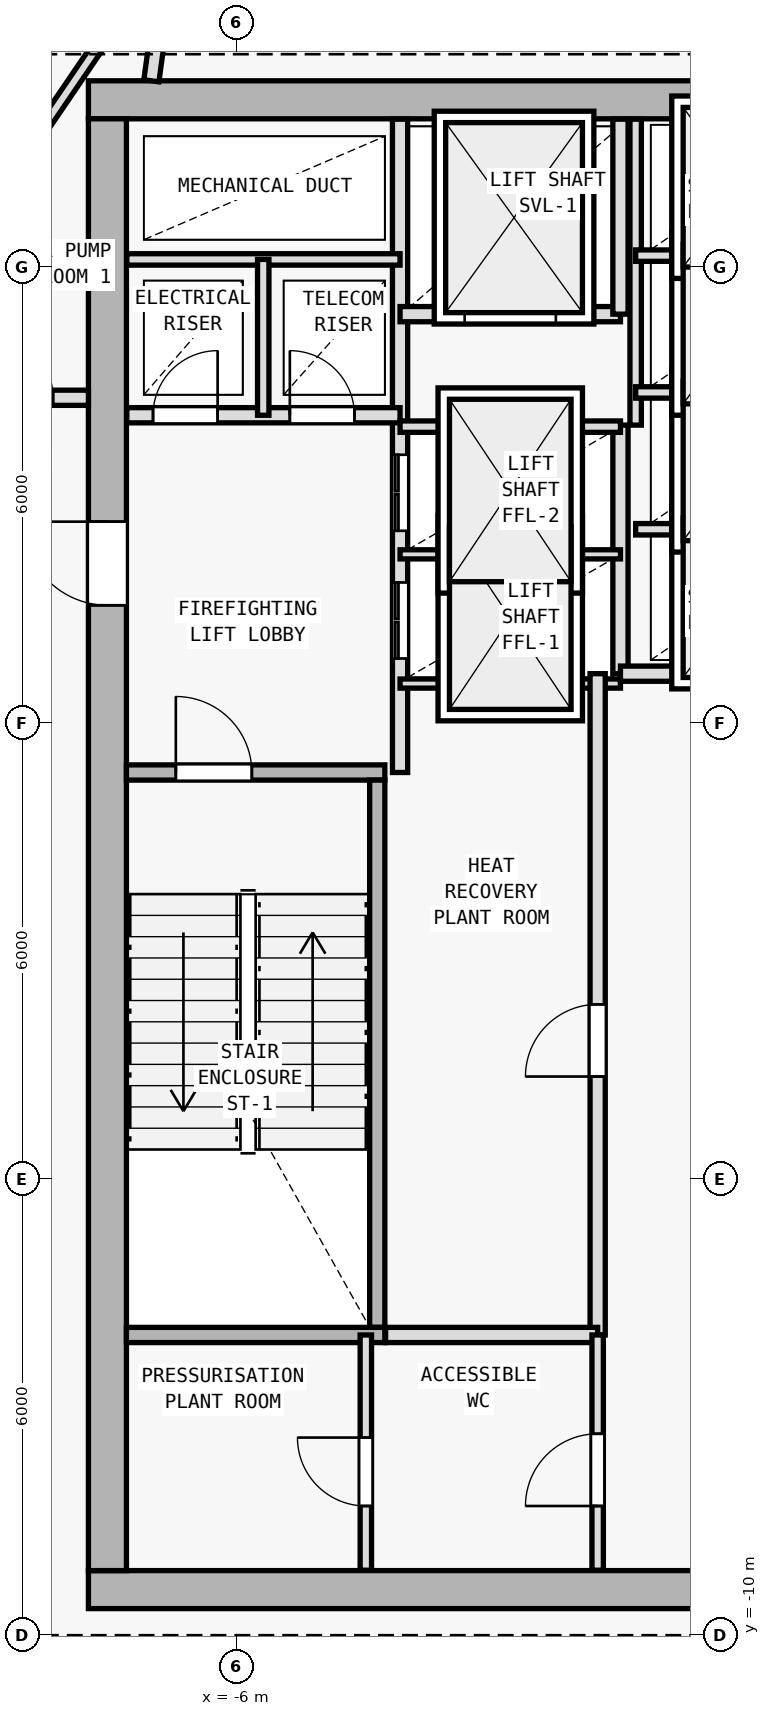
"""IFC4 building model, lengths in metres.
Left out: names, types, materials, properties, quantities, classifications, styles, units other than length and angle.
Written with IfcOpenShell. Run it as: python <this file> out.ifc"""

import sys

from ifc_helpers import new_model, si_unit, direction, frame, frame_2d, origin, origin_2d, place, context, subcontext, project, spatial, rectangle, i_section, extrude, element, fill, save


model = new_model("IFC4")
c1 = context("Model", 3, precision=1e-05, world=origin(), true_north=direction((0.0, 1.0)))
c2 = subcontext(c1, "Body", "Model", "MODEL_VIEW")
j1 = project(units=[si_unit("LENGTHUNIT", "METRE"), si_unit("PLANEANGLEUNIT", "RADIAN")], contexts=[c1])
p1 = place(None, origin())
s1 = spatial("IfcSite", under=j1, at=p1, CompositionType="ELEMENT")
p2 = place(p1, origin())
s2 = spatial("IfcBuilding", under=s1, at=p2, CompositionType="ELEMENT")
p3 = place(p2, frame((0.0, 0.0, 241.5)))
s3 = spatial("IfcBuildingStorey", under=s2, at=p3, CompositionType="ELEMENT", Elevation=241.5)
for number, where, z_axis, x_axis in (
    (1, (-7.7, -9.4, 0.0), (0.0, 0.0, 1.0), (1.0, 0.0, 0.0)),
    (2, (-7.7, 10.2, 0.0), (0.0, 0.0, 1.0), (1.0, 0.0, 0.0)),
    (3, (0.0, -9.4, 0.0), (0.0, 0.0, 1.0), (1.0, 0.0, 0.0)),
    (4, (-7.7, 2.0, 0.0), (0.0, 0.0, 1.0), (1.0, 0.0, 0.0)),
):
    element("IfcColumn", number, at=place(p3, frame(where, z_axis=z_axis, x_axis=x_axis)), inside=s3, PredefinedType="COLUMN", context=c2, shape_type="SweptSolid", body=[
        extrude(i_section(OverallWidth=0.398, OverallDepth=0.387, WebThickness=0.013, FlangeThickness=0.022, FilletRadius=0.015, at=origin_2d()), origin(), (0.0, 0.0, 1.0), 4.8),
    ])
p4 = place(p3, frame((-7.95, -9.4, 0.0), z_axis=(0.0, 0.0, 1.0), x_axis=(1.0, 0.0, 0.0)))
e5 = element("IfcWall", 5, at=p4, inside=s3, PredefinedType="SHEAR", context=c2, shape_type="SweptSolid", body=[
    extrude(rectangle(XDim=15.9, YDim=0.5, at=frame_2d((7.95, 0.0))), origin(), (0.0, 0.0, 1.0), 4.5),
])
p5 = place(p4, frame((9.6, 0.0, 0.0)))
e6 = element("IfcOpeningElement", 6, at=p5, cuts=e5, PredefinedType="OPENING", context=c2, shape_type="SweptSolid", body=[
    extrude(rectangle(XDim=1.5, YDim=2.2, at=frame_2d((0.75, 1.1))), frame((0.0, 0.26, 0.0), z_axis=(0.0, -1.0, 0.0), x_axis=(1.0, 0.0, 0.0)), (0.0, 0.0, 1.0), 0.52),
])
p6 = place(p3, frame((7.95, 10.2, 0.0), z_axis=(0.0, 0.0, 1.0), x_axis=(-1.0, 0.0, 0.0)))
e7 = element("IfcWall", 7, at=p6, inside=s3, PredefinedType="SHEAR", context=c2, shape_type="SweptSolid", body=[
    extrude(rectangle(XDim=15.9, YDim=0.5, at=frame_2d((7.95, 0.0))), origin(), (0.0, 0.0, 1.0), 4.5),
])
p7 = place(p3, frame((-7.7, -9.15, 0.0), z_axis=(0.0, 0.0, 1.0), x_axis=(0.0, 1.0, 0.0)))
e8 = element("IfcWall", 8, at=p7, inside=s3, PredefinedType="SHEAR", context=c2, shape_type="SweptSolid", body=[
    extrude(rectangle(XDim=19.1, YDim=0.5, at=frame_2d((9.55, 0.0))), origin(), (0.0, 0.0, 1.0), 4.5),
])
p8 = place(p7, frame((12.7, 0.0, 0.0)))
e9 = element("IfcOpeningElement", 9, at=p8, cuts=e8, PredefinedType="OPENING", context=c2, shape_type="SweptSolid", body=[
    extrude(rectangle(XDim=1.1, YDim=2.15, at=frame_2d((0.55, 1.075))), frame((0.0, 0.26, 0.0), z_axis=(0.0, -1.0, 0.0), x_axis=(1.0, 0.0, 0.0)), (0.0, 0.0, 1.0), 0.52),
])
p9 = place(p3, frame((-7.45, 1.35, 0.0), z_axis=(0.0, 0.0, 1.0), x_axis=(1.0, 0.0, 0.0)))
e10 = element("IfcWall", 10, at=p9, inside=s3, PredefinedType="SOLIDWALL", context=c2, shape_type="SweptSolid", body=[
    extrude(rectangle(XDim=3.4, YDim=0.2, at=frame_2d((1.7, 0.0))), origin(), (0.0, 0.0, 1.0), 4.5),
])
p10 = place(p9, frame((0.65, 0.0, 0.0)))
e11 = element("IfcOpeningElement", 11, at=p10, cuts=e10, PredefinedType="OPENING", context=c2, shape_type="SweptSolid", body=[
    extrude(rectangle(XDim=1.0, YDim=2.15, at=frame_2d((0.5, 1.075))), frame((0.0, 0.11, 0.0), z_axis=(0.0, -1.0, 0.0), x_axis=(1.0, 0.0, 0.0)), (0.0, 0.0, 1.0), 0.22),
])
p11 = place(p3, frame((-4.15, -5.95, 0.0), z_axis=(0.0, 0.0, 1.0), x_axis=(0.0, 1.0, 0.0)))
e12 = element("IfcWall", 12, at=p11, inside=s3, PredefinedType="SOLIDWALL", context=c2, shape_type="SweptSolid", body=[
    extrude(rectangle(XDim=7.2, YDim=0.2, at=frame_2d((3.6, 0.0))), origin(), (0.0, 0.0, 1.0), 4.5),
])
p12 = place(p3, frame((-3.85, 1.35, 0.0), z_axis=(0.0, 0.0, 1.0), x_axis=(0.0, 1.0, 0.0)))
e13 = element("IfcWall", 13, at=p12, inside=s3, PredefinedType="SOLIDWALL", context=c2, shape_type="SweptSolid", body=[
    extrude(rectangle(XDim=8.595, YDim=0.2, at=frame_2d((4.297, 0.0))), origin(), (0.0, 0.0, 1.0), 4.5),
])
p13 = place(p12, frame((1.5, 0.0, 0.0)))
e14 = element("IfcOpeningElement", 14, at=p13, cuts=e13, PredefinedType="OPENING", context=c2, shape_type="SweptSolid", body=[
    extrude(rectangle(XDim=1.0, YDim=2.15, at=frame_2d((0.5, 1.075))), frame((0.0, 0.11, 0.0), z_axis=(0.0, -1.0, 0.0), x_axis=(1.0, 0.0, 0.0)), (0.0, 0.0, 1.0), 0.22),
])
p14 = place(p12, frame((3.18, 0.0, 0.0)))
e15 = element("IfcOpeningElement", 15, at=p14, cuts=e13, PredefinedType="OPENING", context=c2, shape_type="SweptSolid", body=[
    extrude(rectangle(XDim=1.0, YDim=2.15, at=frame_2d((0.5, 1.075))), frame((0.0, 0.11, 0.0), z_axis=(0.0, -1.0, 0.0), x_axis=(1.0, 0.0, 0.0)), (0.0, 0.0, 1.0), 0.22),
])
p15 = place(p3, frame((-7.445, 6.05, 0.0), z_axis=(0.0, 0.0, 1.0), x_axis=(1.0, 0.0, 0.0)))
e16 = element("IfcWall", 16, at=p15, inside=s3, PredefinedType="SOLIDWALL", context=c2, shape_type="SweptSolid", body=[
    extrude(rectangle(XDim=3.595, YDim=0.2, at=frame_2d((1.797, 0.0))), origin(), (0.0, 0.0, 1.0), 4.5),
])
p16 = place(p15, frame((0.345, 0.0, 0.0)))
e17 = element("IfcOpeningElement", 17, at=p16, cuts=e16, PredefinedType="OPENING", context=c2, shape_type="SweptSolid", body=[
    extrude(rectangle(XDim=0.85, YDim=2.1, at=frame_2d((0.425, 1.05))), frame((0.0, 0.11, 0.0), z_axis=(0.0, -1.0, 0.0), x_axis=(1.0, 0.0, 0.0)), (0.0, 0.0, 1.0), 0.22),
])
p17 = place(p15, frame((2.145, 0.0, 0.0)))
e18 = element("IfcOpeningElement", 18, at=p17, cuts=e16, PredefinedType="OPENING", context=c2, shape_type="SweptSolid", body=[
    extrude(rectangle(XDim=0.85, YDim=2.1, at=frame_2d((0.425, 1.05))), frame((0.0, 0.11, 0.0), z_axis=(0.0, -1.0, 0.0), x_axis=(1.0, 0.0, 0.0)), (0.0, 0.0, 1.0), 0.22),
])
p18 = place(p3, frame((-7.445, 8.1, 0.0), z_axis=(0.0, 0.0, 1.0), x_axis=(1.0, 0.0, 0.0)))
e19 = element("IfcWall", 19, at=p18, inside=s3, PredefinedType="PARTITIONING", context=c2, shape_type="SweptSolid", body=[
    extrude(rectangle(XDim=3.595, YDim=0.15, at=frame_2d((1.797, 0.0))), origin(), (0.0, 0.0, 1.0), 4.5),
])
p19 = place(p3, frame((-5.65, 6.05, 0.0), z_axis=(0.0, 0.0, 1.0), x_axis=(0.0, 1.0, 0.0)))
e20 = element("IfcWall", 20, at=p19, inside=s3, PredefinedType="PARTITIONING", context=c2, shape_type="SweptSolid", body=[
    extrude(rectangle(XDim=2.05, YDim=0.15, at=frame_2d((1.025, 0.0))), origin(), (0.0, 0.0, 1.0), 4.5),
])
p20 = place(p3, frame((-0.95, 2.65, 0.0), z_axis=(0.0, 0.0, 1.0), x_axis=(0.0, 1.0, 0.0)))
e21 = element("IfcWall", 21, at=p20, inside=s3, PredefinedType="SOLIDWALL", context=c2, shape_type="SweptSolid", body=[
    extrude(rectangle(XDim=3.27, YDim=0.2, at=frame_2d((1.635, 0.0))), origin(), (0.0, 0.0, 1.0), 4.5),
])
for number, where, z_axis, x_axis in (
    (22, (-3.85, 2.52, 0.0), (0.0, 0.0, 1.0), (1.0, 0.0, 0.0)),
    (23, (-3.85, 4.22, 0.0), (0.0, 0.0, 1.0), (1.0, 0.0, 0.0)),
):
    element("IfcWall", number, at=place(p3, frame(where, z_axis=z_axis, x_axis=x_axis)), inside=s3, PredefinedType="PARTITIONING", context=c2, shape_type="SweptSolid", body=[
        extrude(rectangle(XDim=2.9, YDim=0.12, at=frame_2d((1.45, 0.0))), origin(), (0.0, 0.0, 1.0), 4.5),
    ])
p21 = place(p3, frame((-3.85, 5.9, 0.0), z_axis=(0.0, 0.0, 1.0), x_axis=(1.0, 0.0, 0.0)))
e24 = element("IfcWall", 24, at=p21, inside=s3, PredefinedType="PARTITIONING", context=c2, shape_type="SweptSolid", body=[
    extrude(rectangle(XDim=2.9, YDim=0.15, at=frame_2d((1.45, 0.0))), origin(), (0.0, 0.0, 1.0), 4.5),
])
p22 = place(p3, frame((-3.85, 7.38, 0.0), z_axis=(0.0, 0.0, 1.0), x_axis=(1.0, 0.0, 0.0)))
e25 = element("IfcWall", 25, at=p22, inside=s3, PredefinedType="SOLIDWALL", context=c2, shape_type="SweptSolid", body=[
    extrude(rectangle(XDim=2.9, YDim=0.2, at=frame_2d((1.45, 0.0))), origin(), (0.0, 0.0, 1.0), 4.5),
])
p23 = place(p22, frame((0.85, 0.0, 0.0)))
e26 = element("IfcOpeningElement", 26, at=p23, cuts=e25, PredefinedType="OPENING", context=c2, shape_type="SweptSolid", body=[
    extrude(rectangle(XDim=1.2, YDim=2.2, at=frame_2d((0.6, 1.1))), frame((0.0, 0.11, 0.0), z_axis=(0.0, -1.0, 0.0), x_axis=(1.0, 0.0, 0.0)), (0.0, 0.0, 1.0), 0.22),
])
p24 = place(p3, frame((-0.95, 7.38, 0.0), z_axis=(0.0, 0.0, 1.0), x_axis=(0.0, 1.0, 0.0)))
e27 = element("IfcWall", 27, at=p24, inside=s3, PredefinedType="SOLIDWALL", context=c2, shape_type="SweptSolid", body=[
    extrude(rectangle(XDim=2.565, YDim=0.2, at=frame_2d((1.283, 0.0))), origin(), (0.0, 0.0, 1.0), 4.5),
])
p25 = place(p3, frame((-1.25, -6.05, 0.0), z_axis=(0.0, 0.0, 1.0), x_axis=(0.0, 1.0, 0.0)))
e28 = element("IfcWall", 28, at=p25, inside=s3, PredefinedType="SOLIDWALL", context=c2, shape_type="SweptSolid", body=[
    extrude(rectangle(XDim=8.7, YDim=0.2, at=frame_2d((4.35, 0.0))), origin(), (0.0, 0.0, 1.0), 4.5),
])
p26 = place(p25, frame((3.4, 0.0, 0.0)))
e29 = element("IfcOpeningElement", 29, at=p26, cuts=e28, PredefinedType="OPENING", context=c2, shape_type="SweptSolid", body=[
    extrude(rectangle(XDim=0.95, YDim=2.1, at=frame_2d((0.475, 1.05))), frame((0.0, 0.11, 0.0), z_axis=(0.0, -1.0, 0.0), x_axis=(1.0, 0.0, 0.0)), (0.0, 0.0, 1.0), 0.22),
])
p27 = place(p3, frame((-0.95, 2.65, 0.0), z_axis=(0.0, 0.0, 1.0), x_axis=(1.0, 0.0, 0.0)))
e30 = element("IfcWall", 30, at=p27, inside=s3, PredefinedType="SOLIDWALL", context=c2, shape_type="SweptSolid", body=[
    extrude(rectangle(XDim=2.9, YDim=0.2, at=frame_2d((1.45, 0.0))), origin(), (0.0, 0.0, 1.0), 4.5),
])
p28 = place(p3, frame((-0.75, 5.92, 0.0), z_axis=(0.0, 0.0, 1.0), x_axis=(0.0, 1.0, 0.0)))
e31 = element("IfcWall", 31, at=p28, inside=s3, PredefinedType="PARTITIONING", context=c2, shape_type="SweptSolid", body=[
    extrude(rectangle(XDim=4.025, YDim=0.15, at=frame_2d((2.013, 0.0))), origin(), (0.0, 0.0, 1.0), 4.5),
])
for number, where, z_axis, x_axis in (
    (32, (-0.75, 4.55, 0.0), (0.0, 0.0, 1.0), (1.0, 0.0, 0.0)),
    (33, (-0.75, 6.35, 0.0), (0.0, 0.0, 1.0), (1.0, 0.0, 0.0)),
    (34, (-0.75, 8.15, 0.0), (0.0, 0.0, 1.0), (1.0, 0.0, 0.0)),
):
    element("IfcWall", number, at=place(p3, frame(where, z_axis=z_axis, x_axis=x_axis)), inside=s3, PredefinedType="PARTITIONING", context=c2, shape_type="SweptSolid", body=[
        extrude(rectangle(XDim=2.7, YDim=0.15, at=frame_2d((1.35, 0.0))), origin(), (0.0, 0.0, 1.0), 4.5),
    ])
p29 = place(p3, frame((-7.45, -6.05, 0.0), z_axis=(0.0, 0.0, 1.0), x_axis=(1.0, 0.0, 0.0)))
e35 = element("IfcWall", 35, at=p29, inside=s3, PredefinedType="SOLIDWALL", context=c2, shape_type="SweptSolid", body=[
    extrude(rectangle(XDim=3.4, YDim=0.2, at=frame_2d((1.7, 0.0))), origin(), (0.0, 0.0, 1.0), 4.5),
])
p30 = place(p3, frame((-4.04, -6.05, 0.0), z_axis=(0.0, 0.0, 1.0), x_axis=(1.0, 0.0, 0.0)))
e36 = element("IfcWall", 36, at=p30, inside=s3, PredefinedType="SOLIDWALL", context=c2, shape_type="SweptSolid", body=[
    extrude(rectangle(XDim=2.79, YDim=0.2, at=frame_2d((1.395, 0.0))), origin(), (0.0, 0.0, 1.0), 4.5),
])
p31 = place(p3, frame((-1.25, -9.145, 0.0), z_axis=(0.0, 0.0, 1.0), x_axis=(0.0, 1.0, 0.0)))
e37 = element("IfcWall", 37, at=p31, inside=s3, PredefinedType="PARTITIONING", context=c2, shape_type="SweptSolid", body=[
    extrude(rectangle(XDim=3.095, YDim=0.15, at=frame_2d((1.547, 0.0))), origin(), (0.0, 0.0, 1.0), 4.5),
])
p32 = place(p31, frame((0.845, 0.0, 0.0)))
e38 = element("IfcOpeningElement", 38, at=p32, cuts=e37, PredefinedType="OPENING", context=c2, shape_type="SweptSolid", body=[
    extrude(rectangle(XDim=0.95, YDim=2.1, at=frame_2d((0.475, 1.05))), frame((0.0, 0.085, 0.0), z_axis=(0.0, -1.0, 0.0), x_axis=(1.0, 0.0, 0.0)), (0.0, 0.0, 1.0), 0.17),
])
p33 = place(p3, frame((-4.3, -9.145, 0.0), z_axis=(0.0, 0.0, 1.0), x_axis=(0.0, 1.0, 0.0)))
e39 = element("IfcWall", 39, at=p33, inside=s3, PredefinedType="PARTITIONING", context=c2, shape_type="SweptSolid", body=[
    extrude(rectangle(XDim=3.095, YDim=0.15, at=frame_2d((1.547, 0.0))), origin(), (0.0, 0.0, 1.0), 4.5),
])
p34 = place(p33, frame((0.845, 0.0, 0.0)))
e40 = element("IfcOpeningElement", 40, at=p34, cuts=e39, PredefinedType="OPENING", context=c2, shape_type="SweptSolid", body=[
    extrude(rectangle(XDim=0.9, YDim=2.1, at=frame_2d((0.45, 1.05))), frame((0.0, 0.085, 0.0), z_axis=(0.0, -1.0, 0.0), x_axis=(1.0, 0.0, 0.0)), (0.0, 0.0, 1.0), 0.17),
])
p35 = place(p3, frame((-12.47, 4.073, 0.0), z_axis=(0.0, 0.0, 1.0), x_axis=(0.562473312613, 0.826815440469, 0.0)))
e41 = element("IfcWall", 41, at=p35, inside=s3, PredefinedType="PARTITIONING", context=c2, shape_type="SweptSolid", body=[
    extrude(rectangle(XDim=11.409, YDim=0.15, at=frame_2d((5.705, 0.0))), origin(), (0.0, 0.0, 1.0), 3.925),
])
p36 = place(p3, frame((-9.83, 6.28, 0.0), z_axis=(0.0, 0.0, 1.0), x_axis=(1.0, 0.0, 0.0)))
e42 = element("IfcWall", 42, at=p36, inside=s3, PredefinedType="SOLIDWALL", context=c2, shape_type="SweptSolid", body=[
    extrude(rectangle(XDim=1.88, YDim=0.2, at=frame_2d((0.94, 0.0))), origin(), (0.0, 0.0, 1.0), 3.925),
])
p37 = place(p36, frame((0.565, 0.0, 0.0)))
e43 = element("IfcOpeningElement", 43, at=p37, cuts=e42, PredefinedType="OPENING", context=c2, shape_type="SweptSolid", body=[
    extrude(rectangle(XDim=0.85, YDim=2.1, at=frame_2d((0.425, 1.05))), frame((0.0, 0.11, 0.0), z_axis=(0.0, -1.0, 0.0), x_axis=(1.0, 0.0, 0.0)), (0.0, 0.0, 1.0), 0.22),
])
p38 = place(p3, frame((-7.122, 10.45, 0.0), z_axis=(0.0, 0.0, 1.0), x_axis=(0.135914078288, 0.990720628292, 0.0)))
e44 = element("IfcWall", 44, at=p38, inside=s3, PredefinedType="SOLIDWALL", context=c2, shape_type="SweptSolid", body=[
    extrude(rectangle(XDim=1.496, YDim=0.2, at=frame_2d((0.748, 0.0))), origin(), (0.0, 0.0, 1.0), 3.925),
])
p39 = place(p8, origin())
e45 = element("IfcDoor", 45, at=p39, inside=s3, OperationType="SINGLE_SWING_RIGHT", PredefinedType="DOOR", context=c2, shape_type="SweptSolid", body=[
    extrude(rectangle(XDim=1.1, YDim=2.15, at=frame_2d((0.55, 1.075))), frame((0.0, 0.025, 0.0), z_axis=(0.0, -1.0, 0.0), x_axis=(1.0, 0.0, 0.0)), (0.0, 0.0, 1.0), 0.05),
])
fill(e9, e45)
p40 = place(p10, origin())
e46 = element("IfcDoor", 46, at=p40, inside=s3, OperationType="SINGLE_SWING_LEFT", PredefinedType="DOOR", context=c2, shape_type="SweptSolid", body=[
    extrude(rectangle(XDim=1.0, YDim=2.15, at=frame_2d((0.5, 1.075))), frame((0.0, 0.025, 0.0), z_axis=(0.0, -1.0, 0.0), x_axis=(1.0, 0.0, 0.0)), (0.0, 0.0, 1.0), 0.05),
])
fill(e11, e46)
p41 = place(p16, origin())
e47 = element("IfcDoor", 47, at=p41, inside=s3, OperationType="SINGLE_SWING_RIGHT", PredefinedType="DOOR", context=c2, shape_type="SweptSolid", body=[
    extrude(rectangle(XDim=0.85, YDim=2.1, at=frame_2d((0.425, 1.05))), frame((0.0, 0.025, 0.0), z_axis=(0.0, -1.0, 0.0), x_axis=(1.0, 0.0, 0.0)), (0.0, 0.0, 1.0), 0.05),
])
fill(e17, e47)
p42 = place(p17, origin())
e48 = element("IfcDoor", 48, at=p42, inside=s3, OperationType="SINGLE_SWING_LEFT", PredefinedType="DOOR", context=c2, shape_type="SweptSolid", body=[
    extrude(rectangle(XDim=0.85, YDim=2.1, at=frame_2d((0.425, 1.05))), frame((0.0, 0.025, 0.0), z_axis=(0.0, -1.0, 0.0), x_axis=(1.0, 0.0, 0.0)), (0.0, 0.0, 1.0), 0.05),
])
fill(e18, e48)
p43 = place(p23, origin())
e49 = element("IfcDoor", 49, at=p43, inside=s3, OperationType="DOUBLE_DOOR_SLIDING", PredefinedType="DOOR", context=c2, shape_type="SweptSolid", body=[
    extrude(rectangle(XDim=1.2, YDim=2.2, at=frame_2d((0.6, 1.1))), frame((0.0, 0.025, 0.0), z_axis=(0.0, -1.0, 0.0), x_axis=(1.0, 0.0, 0.0)), (0.0, 0.0, 1.0), 0.05),
])
fill(e26, e49)
p44 = place(p26, origin())
e50 = element("IfcDoor", 50, at=p44, inside=s3, OperationType="SINGLE_SWING_LEFT", PredefinedType="DOOR", context=c2, shape_type="SweptSolid", body=[
    extrude(rectangle(XDim=0.95, YDim=2.1, at=frame_2d((0.475, 1.05))), frame((0.0, 0.025, 0.0), z_axis=(0.0, -1.0, 0.0), x_axis=(1.0, 0.0, 0.0)), (0.0, 0.0, 1.0), 0.05),
])
fill(e29, e50)
p45 = place(p13, origin())
e51 = element("IfcDoor", 51, at=p45, inside=s3, OperationType="DOUBLE_DOOR_SLIDING", PredefinedType="DOOR", context=c2, shape_type="SweptSolid", body=[
    extrude(rectangle(XDim=1.0, YDim=2.15, at=frame_2d((0.5, 1.075))), frame((0.0, 0.025, 0.0), z_axis=(0.0, -1.0, 0.0), x_axis=(1.0, 0.0, 0.0)), (0.0, 0.0, 1.0), 0.05),
])
fill(e14, e51)
p46 = place(p14, origin())
e52 = element("IfcDoor", 52, at=p46, inside=s3, OperationType="DOUBLE_DOOR_SLIDING", PredefinedType="DOOR", context=c2, shape_type="SweptSolid", body=[
    extrude(rectangle(XDim=1.0, YDim=2.15, at=frame_2d((0.5, 1.075))), frame((0.0, 0.025, 0.0), z_axis=(0.0, -1.0, 0.0), x_axis=(1.0, 0.0, 0.0)), (0.0, 0.0, 1.0), 0.05),
])
fill(e15, e52)
p47 = place(p32, origin())
e53 = element("IfcDoor", 53, at=p47, inside=s3, OperationType="SINGLE_SWING_LEFT", PredefinedType="DOOR", context=c2, shape_type="SweptSolid", body=[
    extrude(rectangle(XDim=0.95, YDim=2.1, at=frame_2d((0.475, 1.05))), frame((0.0, 0.025, 0.0), z_axis=(0.0, -1.0, 0.0), x_axis=(1.0, 0.0, 0.0)), (0.0, 0.0, 1.0), 0.05),
])
fill(e38, e53)
p48 = place(p34, origin())
e54 = element("IfcDoor", 54, at=p48, inside=s3, OperationType="SINGLE_SWING_RIGHT", PredefinedType="DOOR", context=c2, shape_type="SweptSolid", body=[
    extrude(rectangle(XDim=0.9, YDim=2.1, at=frame_2d((0.45, 1.05))), frame((0.0, 0.025, 0.0), z_axis=(0.0, -1.0, 0.0), x_axis=(1.0, 0.0, 0.0)), (0.0, 0.0, 1.0), 0.05),
])
fill(e40, e54)
p49 = place(p37, origin())
e55 = element("IfcDoor", 55, at=p49, inside=s3, OperationType="SINGLE_SWING_LEFT", PredefinedType="DOOR", context=c2, shape_type="SweptSolid", body=[
    extrude(rectangle(XDim=0.85, YDim=2.1, at=frame_2d((0.425, 1.05))), frame((0.0, 0.025, 0.0), z_axis=(0.0, -1.0, 0.0), x_axis=(1.0, 0.0, 0.0)), (0.0, 0.0, 1.0), 0.05),
])
fill(e43, e55)
save(model, sys.argv[1])
